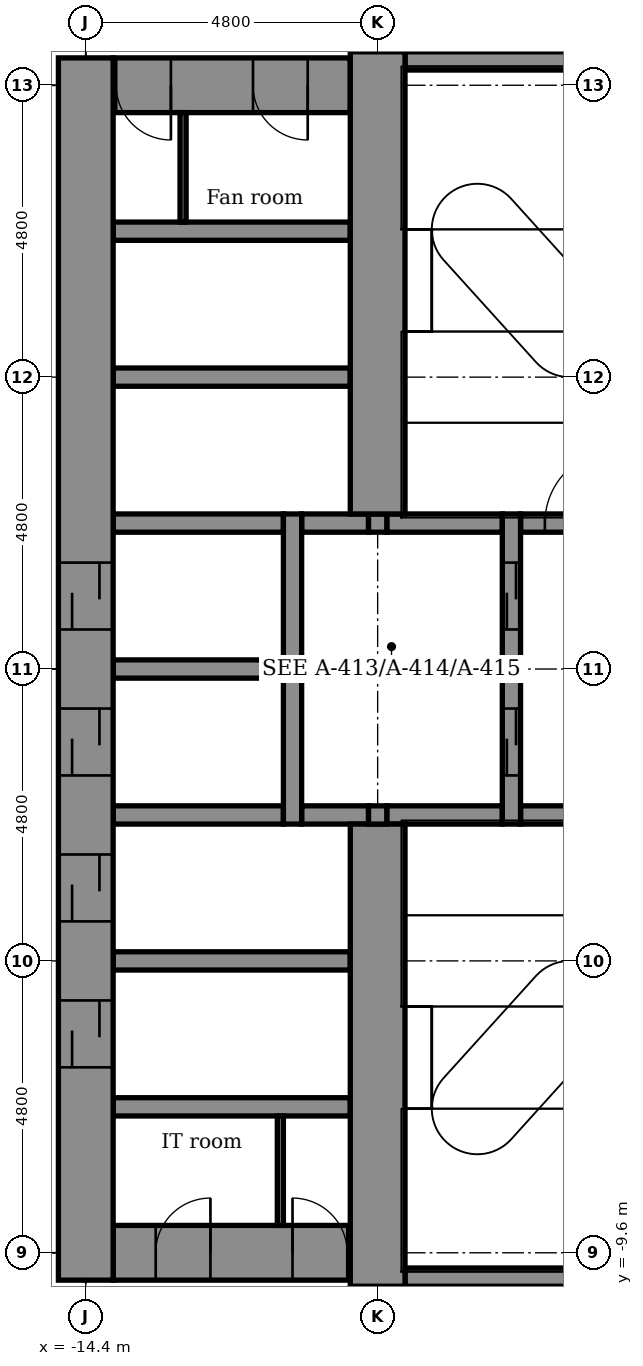
"""IFC4 building model, lengths in metres.
Left out: names, types, materials, properties, quantities, classifications, styles, units other than length and angle.
Written with IfcOpenShell. Run it as: python <this file> out.ifc"""

import sys

from ifc_helpers import new_model, si_unit, direction, frame, frame_2d, origin, place, context, subcontext, project, spatial, rectangle, extrude, element, fill, save


model = new_model("IFC4")
c1 = context("Model", 3, precision=1e-05, world=origin(), true_north=direction((0.0, 1.0)))
c2 = subcontext(c1, "Body", "Model", "MODEL_VIEW")
j1 = project(units=[si_unit("LENGTHUNIT", "METRE"), si_unit("PLANEANGLEUNIT", "RADIAN")], contexts=[c1])
p1 = place(None, origin())
s1 = spatial("IfcSite", under=j1, at=p1, CompositionType="ELEMENT")
p2 = place(p1, origin())
s2 = spatial("IfcBuilding", under=s1, at=p2, CompositionType="ELEMENT")
p3 = place(p2, frame((0.0, 0.0, 109.4)))
s3 = spatial("IfcBuildingStorey", under=s2, at=p3, CompositionType="ELEMENT", Elevation=109.4)
p4 = place(p3, frame((-9.15, -10.0, -0.2), z_axis=(0.0, 0.0, 1.0), x_axis=(1.0, 0.0, 0.0)))
e1 = element("IfcWall", 1, at=p4, inside=s3, PredefinedType="STANDARD", context=c2, shape_type="SweptSolid", body=[
    extrude(rectangle(XDim=3.9, YDim=0.3, at=frame_2d((1.95, 0.0))), origin(), (0.0, 0.0, 1.0), 4.5),
])
p5 = place(p3, frame((-13.95, -9.6, -0.2), z_axis=(0.0, 0.0, 1.0), x_axis=(1.0, 0.0, 0.0)))
e2 = element("IfcWall", 2, at=p5, inside=s3, PredefinedType="SHEAR", context=c2, shape_type="SweptSolid", body=[
    extrude(rectangle(XDim=3.9, YDim=0.9, at=frame_2d((1.95, 0.0))), origin(), (0.0, 0.0, 1.0), 4.5),
])
p6 = place(p5, frame((0.7, 0.0, 0.2)))
e3 = element("IfcOpeningElement", 3, at=p6, cuts=e2, PredefinedType="OPENING", context=c2, shape_type="SweptSolid", body=[
    extrude(rectangle(XDim=0.9, YDim=2.1, at=frame_2d((0.45, 1.05))), frame((0.0, 0.46, 0.0), z_axis=(0.0, -1.0, 0.0), x_axis=(1.0, 0.0, 0.0)), (0.0, 0.0, 1.0), 0.92),
])
p7 = place(p5, frame((2.95, 0.0, 0.2)))
e4 = element("IfcOpeningElement", 4, at=p7, cuts=e2, PredefinedType="OPENING", context=c2, shape_type="SweptSolid", body=[
    extrude(rectangle(XDim=0.9, YDim=2.1, at=frame_2d((0.45, 1.05))), frame((0.0, 0.46, 0.0), z_axis=(0.0, -1.0, 0.0), x_axis=(1.0, 0.0, 0.0)), (0.0, 0.0, 1.0), 0.92),
])
for number, where, z_axis, x_axis in (
    (5, (-13.95, -7.2, -0.2), (0.0, 0.0, 1.0), (1.0, 0.0, 0.0)),
    (6, (-13.95, -4.8, -0.2), (0.0, 0.0, 1.0), (1.0, 0.0, 0.0)),
):
    element("IfcWall", number, at=place(p3, frame(where, z_axis=z_axis, x_axis=x_axis)), inside=s3, PredefinedType="STANDARD", context=c2, shape_type="SweptSolid", body=[
        extrude(rectangle(XDim=3.9, YDim=0.3, at=frame_2d((1.95, 0.0))), origin(), (0.0, 0.0, 1.0), 4.5),
    ])
p8 = place(p3, frame((-13.95, -2.4, -0.2), z_axis=(0.0, 0.0, 1.0), x_axis=(1.0, 0.0, 0.0)))
e7 = element("IfcWall", 7, at=p8, inside=s3, PredefinedType="STANDARD", context=c2, shape_type="SweptSolid", body=[
    extrude(rectangle(XDim=2.8, YDim=0.3, at=frame_2d((1.4, 0.0))), origin(), (0.0, 0.0, 1.0), 4.5),
])
p9 = place(p3, frame((-10.85, -2.4, -0.2), z_axis=(0.0, 0.0, 1.0), x_axis=(1.0, 0.0, 0.0)))
e8 = element("IfcWall", 8, at=p9, inside=s3, PredefinedType="STANDARD", context=c2, shape_type="SweptSolid", body=[
    extrude(rectangle(XDim=1.1, YDim=0.3, at=frame_2d((0.55, 0.0))), origin(), (0.0, 0.0, 1.0), 4.5),
])
p10 = place(p3, frame((-9.45, -2.4, -0.2), z_axis=(0.0, 0.0, 1.0), x_axis=(1.0, 0.0, 0.0)))
e9 = element("IfcWall", 9, at=p10, inside=s3, PredefinedType="STANDARD", context=c2, shape_type="SweptSolid", body=[
    extrude(rectangle(XDim=1.9, YDim=0.3, at=frame_2d((0.95, 0.0))), origin(), (0.0, 0.0, 1.0), 4.5),
])
p11 = place(p3, frame((-7.25, -2.4, -0.2), z_axis=(0.0, 0.0, 1.0), x_axis=(1.0, 0.0, 0.0)))
e10 = element("IfcWall", 10, at=p11, inside=s3, PredefinedType="STANDARD", context=c2, shape_type="SweptSolid", body=[
    extrude(rectangle(XDim=2.0, YDim=0.3, at=frame_2d((1.0, 0.0))), origin(), (0.0, 0.0, 1.0), 4.5),
])
p12 = place(p3, frame((-13.95, 0.0, -0.2), z_axis=(0.0, 0.0, 1.0), x_axis=(1.0, 0.0, 0.0)))
e11 = element("IfcWall", 11, at=p12, inside=s3, PredefinedType="STANDARD", context=c2, shape_type="SweptSolid", body=[
    extrude(rectangle(XDim=2.8, YDim=0.3, at=frame_2d((1.4, 0.0))), origin(), (0.0, 0.0, 1.0), 4.5),
])
p13 = place(p3, frame((-10.85, 0.0, -0.2), z_axis=(0.0, 0.0, 1.0), x_axis=(1.0, 0.0, 0.0)))
e12 = element("IfcWall", 12, at=p13, inside=s3, PredefinedType="STANDARD", context=c2, shape_type="SweptSolid", body=[
    extrude(rectangle(XDim=3.3, YDim=0.3, at=frame_2d((1.65, 0.0))), origin(), (0.0, 0.0, 1.0), 4.5),
])
p14 = place(p3, frame((-13.95, 2.4, -0.2), z_axis=(0.0, 0.0, 1.0), x_axis=(1.0, 0.0, 0.0)))
e13 = element("IfcWall", 13, at=p14, inside=s3, PredefinedType="STANDARD", context=c2, shape_type="SweptSolid", body=[
    extrude(rectangle(XDim=2.8, YDim=0.3, at=frame_2d((1.4, 0.0))), origin(), (0.0, 0.0, 1.0), 4.5),
])
p15 = place(p3, frame((-10.85, 2.4, -0.2), z_axis=(0.0, 0.0, 1.0), x_axis=(1.0, 0.0, 0.0)))
e14 = element("IfcWall", 14, at=p15, inside=s3, PredefinedType="STANDARD", context=c2, shape_type="SweptSolid", body=[
    extrude(rectangle(XDim=1.1, YDim=0.3, at=frame_2d((0.55, 0.0))), origin(), (0.0, 0.0, 1.0), 4.5),
])
p16 = place(p3, frame((-9.45, 2.4, -0.2), z_axis=(0.0, 0.0, 1.0), x_axis=(1.0, 0.0, 0.0)))
e15 = element("IfcWall", 15, at=p16, inside=s3, PredefinedType="STANDARD", context=c2, shape_type="SweptSolid", body=[
    extrude(rectangle(XDim=1.9, YDim=0.3, at=frame_2d((0.95, 0.0))), origin(), (0.0, 0.0, 1.0), 4.5),
])
p17 = place(p3, frame((-7.25, 2.4, -0.2), z_axis=(0.0, 0.0, 1.0), x_axis=(1.0, 0.0, 0.0)))
e16 = element("IfcWall", 16, at=p17, inside=s3, PredefinedType="STANDARD", context=c2, shape_type="SweptSolid", body=[
    extrude(rectangle(XDim=2.0, YDim=0.3, at=frame_2d((1.0, 0.0))), origin(), (0.0, 0.0, 1.0), 4.5),
])
p18 = place(p17, frame((0.4, 0.0, 0.2)))
e17 = element("IfcOpeningElement", 17, at=p18, cuts=e16, PredefinedType="OPENING", context=c2, shape_type="SweptSolid", body=[
    extrude(rectangle(XDim=1.2, YDim=2.1, at=frame_2d((0.6, 1.05))), frame((0.0, 0.16, 0.0), z_axis=(0.0, -1.0, 0.0), x_axis=(1.0, 0.0, 0.0)), (0.0, 0.0, 1.0), 0.32),
])
for number, where, z_axis, x_axis in (
    (18, (-13.95, 4.8, -0.2), (0.0, 0.0, 1.0), (1.0, 0.0, 0.0)),
    (19, (-13.95, 7.2, -0.2), (0.0, 0.0, 1.0), (1.0, 0.0, 0.0)),
):
    element("IfcWall", number, at=place(p3, frame(where, z_axis=z_axis, x_axis=x_axis)), inside=s3, PredefinedType="STANDARD", context=c2, shape_type="SweptSolid", body=[
        extrude(rectangle(XDim=3.9, YDim=0.3, at=frame_2d((1.95, 0.0))), origin(), (0.0, 0.0, 1.0), 4.5),
    ])
p19 = place(p3, frame((-13.95, 9.6, -0.2), z_axis=(0.0, 0.0, 1.0), x_axis=(1.0, 0.0, 0.0)))
e20 = element("IfcWall", 20, at=p19, inside=s3, PredefinedType="SHEAR", context=c2, shape_type="SweptSolid", body=[
    extrude(rectangle(XDim=3.9, YDim=0.9, at=frame_2d((1.95, 0.0))), origin(), (0.0, 0.0, 1.0), 4.5),
])
p20 = place(p19, frame((0.05, 0.0, 0.2)))
e21 = element("IfcOpeningElement", 21, at=p20, cuts=e20, PredefinedType="OPENING", context=c2, shape_type="SweptSolid", body=[
    extrude(rectangle(XDim=0.9, YDim=2.1, at=frame_2d((0.45, 1.05))), frame((0.0, 0.46, 0.0), z_axis=(0.0, -1.0, 0.0), x_axis=(1.0, 0.0, 0.0)), (0.0, 0.0, 1.0), 0.92),
])
p21 = place(p19, frame((2.3, 0.0, 0.2)))
e22 = element("IfcOpeningElement", 22, at=p21, cuts=e20, PredefinedType="OPENING", context=c2, shape_type="SweptSolid", body=[
    extrude(rectangle(XDim=0.9, YDim=2.1, at=frame_2d((0.45, 1.05))), frame((0.0, 0.46, 0.0), z_axis=(0.0, -1.0, 0.0), x_axis=(1.0, 0.0, 0.0)), (0.0, 0.0, 1.0), 0.92),
])
p22 = place(p3, frame((-9.15, 10.0, -0.2), z_axis=(0.0, 0.0, 1.0), x_axis=(1.0, 0.0, 0.0)))
e23 = element("IfcWall", 23, at=p22, inside=s3, PredefinedType="STANDARD", context=c2, shape_type="SweptSolid", body=[
    extrude(rectangle(XDim=3.9, YDim=0.3, at=frame_2d((1.95, 0.0))), origin(), (0.0, 0.0, 1.0), 4.5),
])
p23 = place(p3, frame((-14.4, -10.05, -0.2), z_axis=(0.0, 0.0, 1.0), x_axis=(0.0, 1.0, 0.0)))
e24 = element("IfcWall", 24, at=p23, inside=s3, PredefinedType="SHEAR", context=c2, shape_type="SweptSolid", body=[
    extrude(rectangle(XDim=20.1, YDim=0.9, at=frame_2d((10.05, 0.0))), origin(), (0.0, 0.0, 1.0), 4.5),
])
p24 = place(p23, frame((3.5, 0.0, 0.2)))
e25 = element("IfcOpeningElement", 25, at=p24, cuts=e24, PredefinedType="OPENING", context=c2, shape_type="SweptSolid", body=[
    extrude(rectangle(XDim=1.1, YDim=2.1, at=frame_2d((0.55, 1.05))), frame((0.0, 0.46, 0.0), z_axis=(0.0, -1.0, 0.0), x_axis=(1.0, 0.0, 0.0)), (0.0, 0.0, 1.0), 0.92),
])
p25 = place(p23, frame((5.9, 0.0, 0.2)))
e26 = element("IfcOpeningElement", 26, at=p25, cuts=e24, PredefinedType="OPENING", context=c2, shape_type="SweptSolid", body=[
    extrude(rectangle(XDim=1.1, YDim=2.1, at=frame_2d((0.55, 1.05))), frame((0.0, 0.46, 0.0), z_axis=(0.0, -1.0, 0.0), x_axis=(1.0, 0.0, 0.0)), (0.0, 0.0, 1.0), 0.92),
])
p26 = place(p23, frame((8.3, 0.0, 0.2)))
e27 = element("IfcOpeningElement", 27, at=p26, cuts=e24, PredefinedType="OPENING", context=c2, shape_type="SweptSolid", body=[
    extrude(rectangle(XDim=1.1, YDim=2.1, at=frame_2d((0.55, 1.05))), frame((0.0, 0.46, 0.0), z_axis=(0.0, -1.0, 0.0), x_axis=(1.0, 0.0, 0.0)), (0.0, 0.0, 1.0), 0.92),
])
p27 = place(p23, frame((10.7, 0.0, 0.2)))
e28 = element("IfcOpeningElement", 28, at=p27, cuts=e24, PredefinedType="OPENING", context=c2, shape_type="SweptSolid", body=[
    extrude(rectangle(XDim=1.1, YDim=2.1, at=frame_2d((0.55, 1.05))), frame((0.0, 0.46, 0.0), z_axis=(0.0, -1.0, 0.0), x_axis=(1.0, 0.0, 0.0)), (0.0, 0.0, 1.0), 0.92),
])
p28 = place(p3, frame((-11.0, -2.55, -0.2), z_axis=(0.0, 0.0, 1.0), x_axis=(0.0, 1.0, 0.0)))
e29 = element("IfcWall", 29, at=p28, inside=s3, PredefinedType="STANDARD", context=c2, shape_type="SweptSolid", body=[
    extrude(rectangle(XDim=5.1, YDim=0.3, at=frame_2d((2.55, 0.0))), origin(), (0.0, 0.0, 1.0), 4.5),
])
p29 = place(p3, frame((-9.6, -10.15, -0.2), z_axis=(0.0, 0.0, 1.0), x_axis=(0.0, 1.0, 0.0)))
e30 = element("IfcWall", 30, at=p29, inside=s3, PredefinedType="SHEAR", context=c2, shape_type="SweptSolid", body=[
    extrude(rectangle(XDim=7.6, YDim=0.9, at=frame_2d((3.8, 0.0))), origin(), (0.0, 0.0, 1.0), 4.5),
])
for number, where, z_axis, x_axis in (
    (31, (-9.6, -2.55, -0.2), (0.0, 0.0, 1.0), (0.0, 1.0, 0.0)),
    (32, (-9.6, 2.25, -0.2), (0.0, 0.0, 1.0), (0.0, 1.0, 0.0)),
):
    element("IfcWall", number, at=place(p3, frame(where, z_axis=z_axis, x_axis=x_axis)), inside=s3, PredefinedType="STANDARD", context=c2, shape_type="SweptSolid", body=[
        extrude(rectangle(XDim=0.3, YDim=0.3, at=frame_2d((0.15, 0.0))), origin(), (0.0, 0.0, 1.0), 4.5),
    ])
p30 = place(p3, frame((-9.6, 2.55, -0.2), z_axis=(0.0, 0.0, 1.0), x_axis=(0.0, 1.0, 0.0)))
e33 = element("IfcWall", 33, at=p30, inside=s3, PredefinedType="SHEAR", context=c2, shape_type="SweptSolid", body=[
    extrude(rectangle(XDim=7.6, YDim=0.9, at=frame_2d((3.8, 0.0))), origin(), (0.0, 0.0, 1.0), 4.5),
])
p31 = place(p3, frame((-7.4, -2.55, -0.2), z_axis=(0.0, 0.0, 1.0), x_axis=(0.0, 1.0, 0.0)))
e34 = element("IfcWall", 34, at=p31, inside=s3, PredefinedType="STANDARD", context=c2, shape_type="SweptSolid", body=[
    extrude(rectangle(XDim=5.1, YDim=0.3, at=frame_2d((2.55, 0.0))), origin(), (0.0, 0.0, 1.0), 4.5),
])
p32 = place(p31, frame((0.8, 0.0, 0.2)))
e35 = element("IfcOpeningElement", 35, at=p32, cuts=e34, PredefinedType="OPENING", context=c2, shape_type="SweptSolid", body=[
    extrude(rectangle(XDim=1.1, YDim=2.1, at=frame_2d((0.55, 1.05))), frame((0.0, 0.16, 0.0), z_axis=(0.0, -1.0, 0.0), x_axis=(1.0, 0.0, 0.0)), (0.0, 0.0, 1.0), 0.32),
])
p33 = place(p31, frame((3.2, 0.0, 0.2)))
e36 = element("IfcOpeningElement", 36, at=p33, cuts=e34, PredefinedType="OPENING", context=c2, shape_type="SweptSolid", body=[
    extrude(rectangle(XDim=1.1, YDim=2.1, at=frame_2d((0.55, 1.05))), frame((0.0, 0.16, 0.0), z_axis=(0.0, -1.0, 0.0), x_axis=(1.0, 0.0, 0.0)), (0.0, 0.0, 1.0), 0.32),
])
for number, where, z_axis, x_axis in (
    (37, (-11.2, -9.15, 0.0), (0.0, 0.0, 1.0), (0.0, 1.0, 0.0)),
    (38, (-12.8, 7.35, 0.0), (0.0, 0.0, 1.0), (0.0, 1.0, 0.0)),
):
    element("IfcWall", number, at=place(p3, frame(where, z_axis=z_axis, x_axis=x_axis)), inside=s3, PredefinedType="PARTITIONING", context=c2, shape_type="SweptSolid", body=[
        extrude(rectangle(XDim=1.8, YDim=0.1, at=frame_2d((0.9, 0.0))), origin(), (0.0, 0.0, 1.0), 4.3),
    ])
p34 = place(p32, origin())
e39 = element("IfcDoor", 39, at=p34, inside=s3, OperationType="DOUBLE_DOOR_SLIDING", PredefinedType="DOOR", context=c2, shape_type="SweptSolid", body=[
    extrude(rectangle(XDim=1.1, YDim=2.1, at=frame_2d((0.55, 1.05))), frame((0.0, 0.025, 0.0), z_axis=(0.0, -1.0, 0.0), x_axis=(1.0, 0.0, 0.0)), (0.0, 0.0, 1.0), 0.05),
])
fill(e35, e39)
p35 = place(p33, origin())
e40 = element("IfcDoor", 40, at=p35, inside=s3, OperationType="DOUBLE_DOOR_SLIDING", PredefinedType="DOOR", context=c2, shape_type="SweptSolid", body=[
    extrude(rectangle(XDim=1.1, YDim=2.1, at=frame_2d((0.55, 1.05))), frame((0.0, 0.025, 0.0), z_axis=(0.0, -1.0, 0.0), x_axis=(1.0, 0.0, 0.0)), (0.0, 0.0, 1.0), 0.05),
])
fill(e36, e40)
p36 = place(p24, origin())
e41 = element("IfcDoor", 41, at=p36, inside=s3, OperationType="DOUBLE_DOOR_SLIDING", PredefinedType="DOOR", context=c2, shape_type="SweptSolid", body=[
    extrude(rectangle(XDim=1.1, YDim=2.1, at=frame_2d((0.55, 1.05))), frame((0.0, 0.025, 0.0), z_axis=(0.0, -1.0, 0.0), x_axis=(1.0, 0.0, 0.0)), (0.0, 0.0, 1.0), 0.05),
])
fill(e25, e41)
p37 = place(p25, origin())
e42 = element("IfcDoor", 42, at=p37, inside=s3, OperationType="DOUBLE_DOOR_SLIDING", PredefinedType="DOOR", context=c2, shape_type="SweptSolid", body=[
    extrude(rectangle(XDim=1.1, YDim=2.1, at=frame_2d((0.55, 1.05))), frame((0.0, 0.025, 0.0), z_axis=(0.0, -1.0, 0.0), x_axis=(1.0, 0.0, 0.0)), (0.0, 0.0, 1.0), 0.05),
])
fill(e26, e42)
p38 = place(p26, origin())
e43 = element("IfcDoor", 43, at=p38, inside=s3, OperationType="DOUBLE_DOOR_SLIDING", PredefinedType="DOOR", context=c2, shape_type="SweptSolid", body=[
    extrude(rectangle(XDim=1.1, YDim=2.1, at=frame_2d((0.55, 1.05))), frame((0.0, 0.025, 0.0), z_axis=(0.0, -1.0, 0.0), x_axis=(1.0, 0.0, 0.0)), (0.0, 0.0, 1.0), 0.05),
])
fill(e27, e43)
p39 = place(p27, origin())
e44 = element("IfcDoor", 44, at=p39, inside=s3, OperationType="DOUBLE_DOOR_SLIDING", PredefinedType="DOOR", context=c2, shape_type="SweptSolid", body=[
    extrude(rectangle(XDim=1.1, YDim=2.1, at=frame_2d((0.55, 1.05))), frame((0.0, 0.025, 0.0), z_axis=(0.0, -1.0, 0.0), x_axis=(1.0, 0.0, 0.0)), (0.0, 0.0, 1.0), 0.05),
])
fill(e28, e44)
p40 = place(p6, origin())
e45 = element("IfcDoor", 45, at=p40, inside=s3, OperationType="SINGLE_SWING_RIGHT", PredefinedType="DOOR", context=c2, shape_type="SweptSolid", body=[
    extrude(rectangle(XDim=0.9, YDim=2.1, at=frame_2d((0.45, 1.05))), frame((0.0, 0.025, 0.0), z_axis=(0.0, -1.0, 0.0), x_axis=(1.0, 0.0, 0.0)), (0.0, 0.0, 1.0), 0.05),
])
fill(e3, e45)
p41 = place(p7, origin())
e46 = element("IfcDoor", 46, at=p41, inside=s3, OperationType="SINGLE_SWING_LEFT", PredefinedType="DOOR", context=c2, shape_type="SweptSolid", body=[
    extrude(rectangle(XDim=0.9, YDim=2.1, at=frame_2d((0.45, 1.05))), frame((0.0, 0.025, 0.0), z_axis=(0.0, -1.0, 0.0), x_axis=(1.0, 0.0, 0.0)), (0.0, 0.0, 1.0), 0.05),
])
fill(e4, e46)
p42 = place(p20, frame((0.9, 0.0, 0.0), z_axis=(0.0, 0.0, 1.0), x_axis=(-1.0, 0.0, 0.0)))
e47 = element("IfcDoor", 47, at=p42, inside=s3, OperationType="SINGLE_SWING_RIGHT", PredefinedType="DOOR", context=c2, shape_type="SweptSolid", body=[
    extrude(rectangle(XDim=0.9, YDim=2.1, at=frame_2d((0.45, 1.05))), frame((0.0, 0.025, 0.0), z_axis=(0.0, -1.0, 0.0), x_axis=(1.0, 0.0, 0.0)), (0.0, 0.0, 1.0), 0.05),
])
fill(e21, e47)
p43 = place(p21, frame((0.9, 0.0, 0.0), z_axis=(0.0, 0.0, 1.0), x_axis=(-1.0, 0.0, 0.0)))
e48 = element("IfcDoor", 48, at=p43, inside=s3, OperationType="SINGLE_SWING_RIGHT", PredefinedType="DOOR", context=c2, shape_type="SweptSolid", body=[
    extrude(rectangle(XDim=0.9, YDim=2.1, at=frame_2d((0.45, 1.05))), frame((0.0, 0.025, 0.0), z_axis=(0.0, -1.0, 0.0), x_axis=(1.0, 0.0, 0.0)), (0.0, 0.0, 1.0), 0.05),
])
fill(e22, e48)
p44 = place(p18, origin())
e49 = element("IfcDoor", 49, at=p44, inside=s3, OperationType="SINGLE_SWING_RIGHT", PredefinedType="DOOR", context=c2, shape_type="SweptSolid", body=[
    extrude(rectangle(XDim=1.2, YDim=2.1, at=frame_2d((0.6, 1.05))), frame((0.0, 0.025, 0.0), z_axis=(0.0, -1.0, 0.0), x_axis=(1.0, 0.0, 0.0)), (0.0, 0.0, 1.0), 0.05),
])
fill(e17, e49)
save(model, sys.argv[1])
